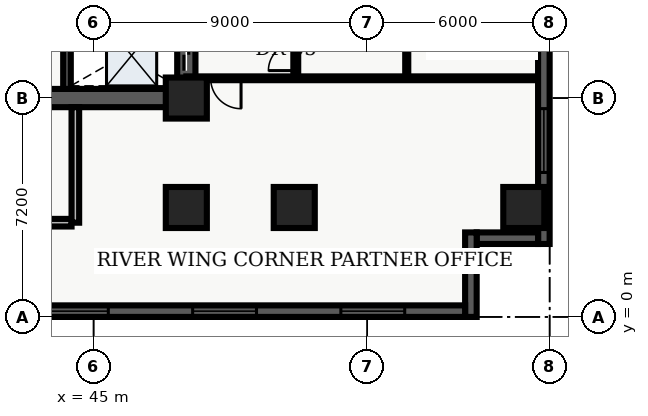
"""IFC4 building model, lengths in metres.
Left out: names, types, materials, properties, quantities, classifications, styles, units other than length and angle.
Written with IfcOpenShell. Run it as: python <this file> out.ifc"""

import sys

from ifc_helpers import new_model, entity, si_unit, converted_unit, direction, frame, origin_with_axes, origin_2d_with_axis, place, context, subcontext, project, spatial, polyline, rectangle, outline, extrude, element, fill, save


model = new_model("IFC4")
c1 = context("Model", 3, precision=1e-05, world=origin_with_axes(), true_north=direction((0.0, 1.0)))
c2 = subcontext(c1, "Body", "Model", "MODEL_VIEW")
j1 = project(units=[si_unit("LENGTHUNIT", "METRE"), converted_unit("PLANEANGLEUNIT", "DEGREE", entity("IfcPlaneAngleMeasure", 0.017), si_unit("PLANEANGLEUNIT", "RADIAN"), dimensions=[0, 0, 0, 0, 0, 0, 0])], contexts=[c1])
p1 = place(None, origin_with_axes())
s1 = spatial("IfcSite", under=j1, at=p1, CompositionType="ELEMENT")
p2 = place(p1, origin_with_axes())
s2 = spatial("IfcBuilding", under=s1, at=p2, CompositionType="ELEMENT")
p3 = place(p2, frame((0.0, 0.0, 44.4), z_axis=(0.0, 0.0, 1.0), x_axis=(1.0, 0.0, 0.0)))
s3 = spatial("IfcBuildingStorey", under=s2, at=p3, CompositionType="ELEMENT", Elevation=44.4)
p4 = place(p3, frame((40.2, 7.2, 0.0), z_axis=(0.0, 0.0, 1.0), x_axis=(1.0, 0.0, 0.0)))
e1 = element("IfcWall", 1, at=p4, inside=s3, PredefinedType="SHEAR", context=c2, shape_type="SweptSolid", body=[
    extrude(outline(polyline([(0.0, -0.3), (7.85, -0.3), (7.85, 0.3), (0.0, 0.3), (0.0, -0.3)])), origin_with_axes(), (0.0, 0.0, 1.0), 3.66),
])
p5 = place(p4, frame((2.175, 0.0, 0.0), z_axis=(0.0, 0.0, 1.0), x_axis=(1.0, 0.0, 0.0)))
e2 = element("IfcOpeningElement", 2, at=p5, cuts=e1, PredefinedType="OPENING", context=c2, shape_type="SweptSolid", body=[
    extrude(rectangle(XDim=1.05, YDim=0.62, at=origin_2d_with_axis()), origin_with_axes(), (0.0, 0.0, 1.0), 2.15),
])
p6 = place(p3, frame((48.05, 7.2, 0.0), z_axis=(0.0, 0.0, 1.0), x_axis=(0.0, 1.0, 0.0)))
e3 = element("IfcWall", 3, at=p6, inside=s3, PredefinedType="SHEAR", context=c2, shape_type="SweptSolid", body=[
    extrude(outline(polyline([(0.0, -0.3), (15.6, -0.3), (15.6, 0.3), (0.0, 0.3), (0.0, -0.3)])), origin_with_axes(), (0.0, 0.0, 1.0), 3.66),
])
p7 = place(p6, frame((1.425, 0.0, 0.0), z_axis=(0.0, 0.0, 1.0), x_axis=(1.0, 0.0, 0.0)))
e4 = element("IfcOpeningElement", 4, at=p7, cuts=e3, PredefinedType="OPENING", context=c2, shape_type="SweptSolid", body=[
    extrude(rectangle(XDim=1.05, YDim=0.62, at=origin_2d_with_axis()), origin_with_axes(), (0.0, 0.0, 1.0), 2.15),
])
p8 = place(p6, frame((3.475, 0.0, 0.0), z_axis=(0.0, 0.0, 1.0), x_axis=(1.0, 0.0, 0.0)))
e5 = element("IfcOpeningElement", 5, at=p8, cuts=e3, PredefinedType="OPENING", context=c2, shape_type="SweptSolid", body=[
    extrude(rectangle(XDim=1.05, YDim=0.62, at=origin_2d_with_axis()), origin_with_axes(), (0.0, 0.0, 1.0), 2.15),
])
p9 = place(p6, frame((5.625, 0.0, 0.0), z_axis=(0.0, 0.0, 1.0), x_axis=(1.0, 0.0, 0.0)))
e6 = element("IfcOpeningElement", 6, at=p9, cuts=e3, PredefinedType="OPENING", context=c2, shape_type="SweptSolid", body=[
    extrude(rectangle(XDim=0.95, YDim=0.62, at=origin_2d_with_axis()), origin_with_axes(), (0.0, 0.0, 1.0), 2.15),
])
p10 = place(p3, frame((44.125, 7.5, 0.0), z_axis=(0.0, 0.0, 1.0), x_axis=(0.0, 1.0, 0.0)))
e7 = element("IfcWall", 7, at=p10, inside=s3, PredefinedType="SHEAR", context=c2, shape_type="SweptSolid", body=[
    extrude(outline(polyline([(0.0, -0.125), (15.0, -0.125), (15.0, 0.125), (0.0, 0.125), (0.0, -0.125)])), origin_with_axes(), (0.0, 0.0, 1.0), 3.66),
])
p11 = place(p3, frame((40.325, 3.1, 0.0), z_axis=(0.0, 0.0, 1.0), x_axis=(1.0, 0.0, 0.0)))
e8 = element("IfcWall", 8, at=p11, inside=s3, PredefinedType="SOLIDWALL", context=c2, shape_type="SweptSolid", body=[
    extrude(outline(polyline([(0.0, -0.125), (3.95, -0.125), (3.95, 0.125), (0.0, 0.125), (0.0, -0.125)])), origin_with_axes(), (0.0, 0.0, 1.0), 2.7),
])
p12 = place(p3, frame((44.4, 3.1, 0.0), z_axis=(0.0, 0.0, 1.0), x_axis=(0.0, 1.0, 0.0)))
e9 = element("IfcWall", 9, at=p12, inside=s3, PredefinedType="SOLIDWALL", context=c2, shape_type="SweptSolid", body=[
    extrude(outline(polyline([(0.0, -0.125), (3.8, -0.125), (3.8, 0.125), (0.0, 0.125), (0.0, -0.125)])), origin_with_axes(), (0.0, 0.0, 1.0), 2.7),
])
for number, where, z_axis, x_axis in (
    (10, (48.05, 3.6, 0.0), (0.0, 0.0, 1.0), (1.0, 0.0, 0.0)),
    (11, (48.05, 7.2, 0.0), (0.0, 0.0, 1.0), (1.0, 0.0, 0.0)),
    (12, (51.6, 3.6, 0.0), (0.0, 0.0, 1.0), (1.0, 0.0, 0.0)),
    (13, (59.15, 3.6, 0.0), (0.0, 0.0, 1.0), (1.0, 0.0, 0.0)),
):
    element("IfcColumn", number, at=place(p3, frame(where, z_axis=z_axis, x_axis=x_axis)), inside=s3, PredefinedType="COLUMN", context=c2, shape_type="SweptSolid", body=[
        extrude(rectangle(XDim=1.35, YDim=1.35, at=origin_2d_with_axis()), origin_with_axes(), (0.0, 0.0, 1.0), 3.9),
    ])
p13 = place(p3, frame((51.65, 7.85, 0.0), z_axis=(0.0, 0.0, 1.0), x_axis=(0.0, 1.0, 0.0)))
e14 = element("IfcWall", 14, at=p13, inside=s3, PredefinedType="PARTITIONING", context=c2, shape_type="SweptSolid", body=[
    extrude(outline(polyline([(0.0, -0.08), (18.8, -0.08), (18.8, 0.08), (0.0, 0.08), (0.0, -0.08)])), origin_with_axes(), (0.0, 0.0, 1.0), 2.7),
])
p14 = place(p13, frame((0.703, 0.0, 0.0), z_axis=(0.0, 0.0, 1.0), x_axis=(1.0, 0.0, 0.0)))
e15 = element("IfcOpeningElement", 15, at=p14, cuts=e14, PredefinedType="OPENING", context=c2, shape_type="SweptSolid", body=[
    extrude(rectangle(XDim=0.9, YDim=0.18, at=origin_2d_with_axis()), origin_with_axes(), (0.0, 0.0, 1.0), 2.15),
])
p15 = place(p13, frame((5.962, 0.0, 0.0), z_axis=(0.0, 0.0, 1.0), x_axis=(1.0, 0.0, 0.0)))
e16 = element("IfcOpeningElement", 16, at=p15, cuts=e14, PredefinedType="OPENING", context=c2, shape_type="SweptSolid", body=[
    extrude(rectangle(XDim=1.0, YDim=0.18, at=origin_2d_with_axis()), origin_with_axes(), (0.0, 0.0, 1.0), 2.15),
])
p16 = place(p13, frame((11.795, 0.0, 0.0), z_axis=(0.0, 0.0, 1.0), x_axis=(1.0, 0.0, 0.0)))
e17 = element("IfcOpeningElement", 17, at=p16, cuts=e14, PredefinedType="OPENING", context=c2, shape_type="SweptSolid", body=[
    extrude(rectangle(XDim=1.0, YDim=0.18, at=origin_2d_with_axis()), origin_with_axes(), (0.0, 0.0, 1.0), 2.15),
])
p17 = place(p13, frame((18.026, 0.0, 0.0), z_axis=(0.0, 0.0, 1.0), x_axis=(1.0, 0.0, 0.0)))
e18 = element("IfcOpeningElement", 18, at=p17, cuts=e14, PredefinedType="OPENING", context=c2, shape_type="SweptSolid", body=[
    extrude(rectangle(XDim=1.0, YDim=0.18, at=origin_2d_with_axis()), origin_with_axes(), (0.0, 0.0, 1.0), 2.15),
])
p18 = place(p3, frame((59.64, 7.85, 0.0), z_axis=(0.0, 0.0, 1.0), x_axis=(-1.0, 0.0, 0.0)))
e19 = element("IfcWall", 19, at=p18, inside=s3, PredefinedType="PARTITIONING", context=c2, shape_type="SweptSolid", body=[
    extrude(outline(polyline([(0.0, -0.062), (11.59, -0.062), (11.59, 0.062), (0.0, 0.062), (0.0, -0.062)])), origin_with_axes(), (0.0, 0.0, 1.0), 2.7),
])
p19 = place(p18, frame((10.29, 0.0, 0.0), z_axis=(0.0, 0.0, 1.0), x_axis=(1.0, 0.0, 0.0)))
e20 = element("IfcOpeningElement", 20, at=p19, cuts=e19, PredefinedType="OPENING", context=c2, shape_type="SweptSolid", body=[
    extrude(rectangle(XDim=1.0, YDim=0.145, at=origin_2d_with_axis()), origin_with_axes(), (0.0, 0.0, 1.0), 2.15),
])
p20 = place(p3, frame((55.3, 7.98, 0.0), z_axis=(0.0, 0.0, 1.0), x_axis=(0.0, 1.0, 0.0)))
e21 = element("IfcWall", 21, at=p20, inside=s3, PredefinedType="PARTITIONING", context=c2, shape_type="SweptSolid", body=[
    extrude(outline(polyline([(0.0, -0.05), (18.54, -0.05), (18.54, 0.05), (0.0, 0.05), (0.0, -0.05)])), origin_with_axes(), (0.0, 0.0, 1.0), 2.7),
])
p21 = place(p20, frame((1.823, 0.0, 0.0), z_axis=(0.0, 0.0, 1.0), x_axis=(1.0, 0.0, 0.0)))
e22 = element("IfcOpeningElement", 22, at=p21, cuts=e21, PredefinedType="OPENING", context=c2, shape_type="SweptSolid", body=[
    extrude(rectangle(XDim=0.95, YDim=0.12, at=origin_2d_with_axis()), origin_with_axes(), (0.0, 0.0, 1.0), 2.15),
])
p22 = place(p20, frame((5.832, 0.0, 0.0), z_axis=(0.0, 0.0, 1.0), x_axis=(1.0, 0.0, 0.0)))
e23 = element("IfcOpeningElement", 23, at=p22, cuts=e21, PredefinedType="OPENING", context=c2, shape_type="SweptSolid", body=[
    extrude(rectangle(XDim=0.95, YDim=0.12, at=origin_2d_with_axis()), origin_with_axes(), (0.0, 0.0, 1.0), 2.15),
])
p23 = place(p20, frame((10.415, 0.0, 0.0), z_axis=(0.0, 0.0, 1.0), x_axis=(1.0, 0.0, 0.0)))
e24 = element("IfcOpeningElement", 24, at=p23, cuts=e21, PredefinedType="OPENING", context=c2, shape_type="SweptSolid", body=[
    extrude(rectangle(XDim=0.95, YDim=0.12, at=origin_2d_with_axis()), origin_with_axes(), (0.0, 0.0, 1.0), 2.15),
])
p24 = place(p20, frame((15.745, 0.0, 0.0), z_axis=(0.0, 0.0, 1.0), x_axis=(1.0, 0.0, 0.0)))
e25 = element("IfcOpeningElement", 25, at=p24, cuts=e21, PredefinedType="OPENING", context=c2, shape_type="SweptSolid", body=[
    extrude(rectangle(XDim=0.95, YDim=0.12, at=origin_2d_with_axis()), origin_with_axes(), (0.0, 0.0, 1.0), 2.15),
])
p25 = place(p3, frame((59.81, 26.02, 0.0), z_axis=(0.0, 0.0, 1.0), x_axis=(0.0, -1.0, 0.0)))
e26 = element("IfcWall", 26, at=p25, inside=s3, PredefinedType="SOLIDWALL", context=c2, shape_type="SweptSolid", body=[
    extrude(outline(polyline([(0.0, -0.19), (23.62, -0.19), (23.62, 0.19), (0.0, 0.19), (0.0, -0.19)])), origin_with_axes(), (0.0, 0.0, 1.0), 3.66),
])
p26 = place(p25, frame((20.218, 0.0, 0.45), z_axis=(0.0, 0.0, 1.0), x_axis=(1.0, 0.0, 0.0)))
e27 = element("IfcOpeningElement", 27, at=p26, cuts=e26, PredefinedType="OPENING", context=c2, shape_type="SweptSolid", body=[
    extrude(rectangle(XDim=2.1, YDim=0.4, at=origin_2d_with_axis()), origin_with_axes(), (0.0, 0.0, 1.0), 2.2),
])
p27 = place(p3, frame((59.62, 2.59, 0.0), z_axis=(0.0, 0.0, 1.0), x_axis=(-1.0, 0.0, 0.0)))
e28 = element("IfcWall", 28, at=p27, inside=s3, PredefinedType="SOLIDWALL", context=c2, shape_type="SweptSolid", body=[
    extrude(outline(polyline([(0.0, -0.19), (2.02, -0.19), (2.02, 0.19), (0.0, 0.19), (0.0, -0.19)])), origin_with_axes(), (0.0, 0.0, 1.0), 3.66),
])
p28 = place(p3, frame((57.41, 2.78, 0.0), z_axis=(0.0, 0.0, 1.0), x_axis=(0.0, -1.0, 0.0)))
e29 = element("IfcWall", 29, at=p28, inside=s3, PredefinedType="SOLIDWALL", context=c2, shape_type="SweptSolid", body=[
    extrude(outline(polyline([(0.0, -0.19), (2.78, -0.19), (2.78, 0.19), (0.0, 0.19), (0.0, -0.19)])), origin_with_axes(), (0.0, 0.0, 1.0), 3.66),
])
p29 = place(p3, frame((57.22, 0.19, 0.0), z_axis=(0.0, 0.0, 1.0), x_axis=(-1.0, 0.0, 0.0)))
e30 = element("IfcWall", 30, at=p29, inside=s3, PredefinedType="SOLIDWALL", context=c2, shape_type="SweptSolid", body=[
    extrude(outline(polyline([(0.0, -0.19), (54.82, -0.19), (54.82, 0.19), (0.0, 0.19), (0.0, -0.19)])), origin_with_axes(), (0.0, 0.0, 1.0), 3.66),
])
p30 = place(p29, frame((3.037, 0.0, 0.45), z_axis=(0.0, 0.0, 1.0), x_axis=(1.0, 0.0, 0.0)))
e31 = element("IfcOpeningElement", 31, at=p30, cuts=e30, PredefinedType="OPENING", context=c2, shape_type="SweptSolid", body=[
    extrude(rectangle(XDim=2.1, YDim=0.4, at=origin_2d_with_axis()), origin_with_axes(), (0.0, 0.0, 1.0), 2.2),
])
p31 = place(p29, frame((7.912, 0.0, 0.45), z_axis=(0.0, 0.0, 1.0), x_axis=(1.0, 0.0, 0.0)))
e32 = element("IfcOpeningElement", 32, at=p31, cuts=e30, PredefinedType="OPENING", context=c2, shape_type="SweptSolid", body=[
    extrude(rectangle(XDim=2.1, YDim=0.4, at=origin_2d_with_axis()), origin_with_axes(), (0.0, 0.0, 1.0), 2.2),
])
p32 = place(p29, frame((12.786, 0.0, 0.45), z_axis=(0.0, 0.0, 1.0), x_axis=(1.0, 0.0, 0.0)))
e33 = element("IfcOpeningElement", 33, at=p32, cuts=e30, PredefinedType="OPENING", context=c2, shape_type="SweptSolid", body=[
    extrude(rectangle(XDim=2.1, YDim=0.4, at=origin_2d_with_axis()), origin_with_axes(), (0.0, 0.0, 1.0), 2.2),
])
p33 = place(p29, frame((17.661, 0.0, 0.45), z_axis=(0.0, 0.0, 1.0), x_axis=(1.0, 0.0, 0.0)))
e34 = element("IfcOpeningElement", 34, at=p33, cuts=e30, PredefinedType="OPENING", context=c2, shape_type="SweptSolid", body=[
    extrude(rectangle(XDim=2.1, YDim=0.4, at=origin_2d_with_axis()), origin_with_axes(), (0.0, 0.0, 1.0), 2.2),
])
p34 = place(p29, frame((22.535, 0.0, 0.45), z_axis=(0.0, 0.0, 1.0), x_axis=(1.0, 0.0, 0.0)))
e35 = element("IfcOpeningElement", 35, at=p34, cuts=e30, PredefinedType="OPENING", context=c2, shape_type="SweptSolid", body=[
    extrude(rectangle(XDim=2.1, YDim=0.4, at=origin_2d_with_axis()), origin_with_axes(), (0.0, 0.0, 1.0), 2.2),
])
p35 = place(p29, frame((27.41, 0.0, 0.45), z_axis=(0.0, 0.0, 1.0), x_axis=(1.0, 0.0, 0.0)))
e36 = element("IfcOpeningElement", 36, at=p35, cuts=e30, PredefinedType="OPENING", context=c2, shape_type="SweptSolid", body=[
    extrude(rectangle(XDim=2.1, YDim=0.4, at=origin_2d_with_axis()), origin_with_axes(), (0.0, 0.0, 1.0), 2.2),
])
p36 = place(p29, frame((32.285, 0.0, 0.45), z_axis=(0.0, 0.0, 1.0), x_axis=(1.0, 0.0, 0.0)))
e37 = element("IfcOpeningElement", 37, at=p36, cuts=e30, PredefinedType="OPENING", context=c2, shape_type="SweptSolid", body=[
    extrude(rectangle(XDim=2.1, YDim=0.4, at=origin_2d_with_axis()), origin_with_axes(), (0.0, 0.0, 1.0), 2.2),
])
p37 = place(p29, frame((37.159, 0.0, 0.45), z_axis=(0.0, 0.0, 1.0), x_axis=(1.0, 0.0, 0.0)))
e38 = element("IfcOpeningElement", 38, at=p37, cuts=e30, PredefinedType="OPENING", context=c2, shape_type="SweptSolid", body=[
    extrude(rectangle(XDim=2.1, YDim=0.4, at=origin_2d_with_axis()), origin_with_axes(), (0.0, 0.0, 1.0), 2.2),
])
p38 = place(p29, frame((42.034, 0.0, 0.45), z_axis=(0.0, 0.0, 1.0), x_axis=(1.0, 0.0, 0.0)))
e39 = element("IfcOpeningElement", 39, at=p38, cuts=e30, PredefinedType="OPENING", context=c2, shape_type="SweptSolid", body=[
    extrude(rectangle(XDim=2.1, YDim=0.4, at=origin_2d_with_axis()), origin_with_axes(), (0.0, 0.0, 1.0), 2.2),
])
p39 = place(p29, frame((46.058, 0.0, 0.45), z_axis=(0.0, 0.0, 1.0), x_axis=(1.0, 0.0, 0.0)))
e40 = element("IfcOpeningElement", 40, at=p39, cuts=e30, PredefinedType="OPENING", context=c2, shape_type="SweptSolid", body=[
    extrude(rectangle(XDim=2.1, YDim=0.4, at=origin_2d_with_axis()), origin_with_axes(), (0.0, 0.0, 1.0), 2.2),
])
p40 = place(p29, frame((51.783, 0.0, 0.45), z_axis=(0.0, 0.0, 1.0), x_axis=(1.0, 0.0, 0.0)))
e41 = element("IfcOpeningElement", 41, at=p40, cuts=e30, PredefinedType="OPENING", context=c2, shape_type="SweptSolid", body=[
    extrude(rectangle(XDim=2.1, YDim=0.4, at=origin_2d_with_axis()), origin_with_axes(), (0.0, 0.0, 1.0), 2.2),
])
p41 = place(p6, frame((1.425, 0.0, 0.0), z_axis=(0.0, 0.0, 1.0), x_axis=(1.0, 0.0, 0.0)))
e42 = element("IfcDoor", 42, at=p41, inside=s3, OperationType="SLIDING_TO_LEFT", PredefinedType="DOOR", context=c2, shape_type="SweptSolid", body=[
    extrude(rectangle(XDim=1.05, YDim=0.09, at=origin_2d_with_axis()), origin_with_axes(), (0.0, 0.0, 1.0), 2.15),
])
fill(e4, e42)
p42 = place(p18, frame((10.29, 0.0, 0.0), z_axis=(0.0, 0.0, 1.0), x_axis=(1.0, 0.0, 0.0)))
e43 = element("IfcDoor", 43, at=p42, inside=s3, OperationType="SINGLE_SWING_LEFT", PredefinedType="DOOR", context=c2, shape_type="SweptSolid", body=[
    extrude(rectangle(XDim=1.0, YDim=0.075, at=origin_2d_with_axis()), origin_with_axes(), (0.0, 0.0, 1.0), 2.15),
])
fill(e20, e43)
p43 = place(p13, frame((0.703, 0.0, 0.0), z_axis=(0.0, 0.0, 1.0), x_axis=(1.0, 0.0, 0.0)))
e44 = element("IfcDoor", 44, at=p43, inside=s3, OperationType="SINGLE_SWING_LEFT", PredefinedType="DOOR", context=c2, shape_type="SweptSolid", body=[
    extrude(rectangle(XDim=0.9, YDim=0.09, at=origin_2d_with_axis()), origin_with_axes(), (0.0, 0.0, 1.0), 2.15),
])
fill(e15, e44)
p44 = place(p25, frame((20.218, 0.0, 0.45), z_axis=(0.0, 0.0, 1.0), x_axis=(1.0, 0.0, 0.0)))
e45 = element("IfcWindow", 45, at=p44, inside=s3, PredefinedType="WINDOW", context=c2, shape_type="SweptSolid", body=[
    extrude(rectangle(XDim=2.1, YDim=0.09, at=origin_2d_with_axis()), origin_with_axes(), (0.0, 0.0, 1.0), 2.2),
])
fill(e27, e45)
p45 = place(p29, frame((3.037, 0.0, 0.45), z_axis=(0.0, 0.0, 1.0), x_axis=(1.0, 0.0, 0.0)))
e46 = element("IfcWindow", 46, at=p45, inside=s3, PredefinedType="WINDOW", context=c2, shape_type="SweptSolid", body=[
    extrude(rectangle(XDim=2.1, YDim=0.09, at=origin_2d_with_axis()), origin_with_axes(), (0.0, 0.0, 1.0), 2.2),
])
fill(e31, e46)
p46 = place(p29, frame((7.912, 0.0, 0.45), z_axis=(0.0, 0.0, 1.0), x_axis=(1.0, 0.0, 0.0)))
e47 = element("IfcWindow", 47, at=p46, inside=s3, PredefinedType="WINDOW", context=c2, shape_type="SweptSolid", body=[
    extrude(rectangle(XDim=2.1, YDim=0.09, at=origin_2d_with_axis()), origin_with_axes(), (0.0, 0.0, 1.0), 2.2),
])
fill(e32, e47)
p47 = place(p29, frame((12.786, 0.0, 0.45), z_axis=(0.0, 0.0, 1.0), x_axis=(1.0, 0.0, 0.0)))
e48 = element("IfcWindow", 48, at=p47, inside=s3, PredefinedType="WINDOW", context=c2, shape_type="SweptSolid", body=[
    extrude(rectangle(XDim=2.1, YDim=0.09, at=origin_2d_with_axis()), origin_with_axes(), (0.0, 0.0, 1.0), 2.2),
])
fill(e33, e48)
save(model, sys.argv[1])
